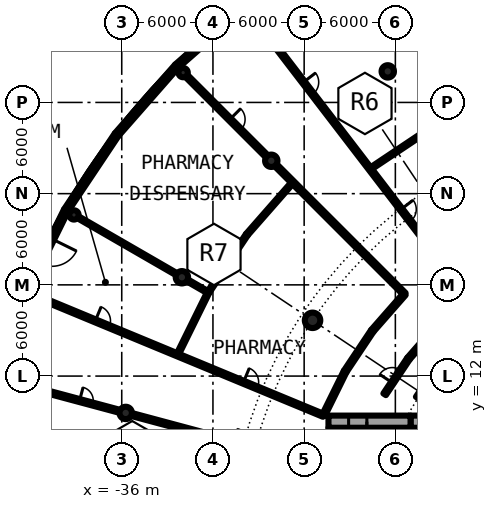
"""IFC4 building model, lengths in metres.
Left out: names, types, materials, properties, quantities, classifications, styles, units other than length and angle.
Written with IfcOpenShell. Run it as: python <this file> out.ifc"""

import sys

from ifc_helpers import new_model, si_unit, direction, frame, frame_2d, origin, origin_2d, place, context, subcontext, project, spatial, rectangle, hollow_circle, i_section, extrude, element, fill, save


model = new_model("IFC4")
c1 = context("Model", 3, precision=1e-05, world=origin(), true_north=direction((0.0, 1.0)))
c2 = subcontext(c1, "Body", "Model", "MODEL_VIEW")
j1 = project(units=[si_unit("LENGTHUNIT", "METRE"), si_unit("PLANEANGLEUNIT", "RADIAN")], contexts=[c1])
p1 = place(None, origin())
s1 = spatial("IfcSite", under=j1, at=p1, CompositionType="ELEMENT")
p2 = place(p1, origin())
s2 = spatial("IfcBuilding", under=s1, at=p2, CompositionType="ELEMENT")
p3 = place(p2, origin())
s3 = spatial("IfcBuildingStorey", under=s2, at=p3, CompositionType="ELEMENT", Elevation=0.0)
p4 = place(p3, frame((-23.448, 15.667, -0.5), z_axis=(0.0, 0.0, 1.0), x_axis=(1.0, 0.0, 0.0)))
e1 = element("IfcColumn", 1, at=p4, inside=s3, PredefinedType="COLUMN", context=c2, shape_type="SweptSolid", body=[
    extrude(hollow_circle(Radius=0.508, WallThickness=0.05, at=origin_2d()), origin(), (0.0, 0.0, 1.0), 5.9),
])
p5 = place(p3, frame((-16.297, 10.889, -0.5), z_axis=(0.0, 0.0, 1.0), x_axis=(-0.831469612303, 0.55557023302, 0.0)))
e2 = element("IfcColumn", 2, at=p5, inside=s3, PredefinedType="COLUMN", context=c2, shape_type="SweptSolid", body=[
    extrude(i_section(OverallWidth=0.303, OverallDepth=0.814, WebThickness=0.021, FlangeThickness=0.04, FilletRadius=0.03, at=origin_2d()), origin(), (0.0, 0.0, 1.0), 5.9),
])
for number, where, z_axis, x_axis in (
    (3, (-18.5, 32.043, -0.5), (0.0, 0.0, 1.0), (1.0, 0.0, 0.0)),
    (4, (-26.163, 26.163, -0.5), (0.0, 0.0, 1.0), (1.0, 0.0, 0.0)),
    (5, (-32.043, 18.5, -0.5), (0.0, 0.0, 1.0), (1.0, 0.0, 0.0)),
    (6, (-35.739, 9.576, -0.5), (0.0, 0.0, 1.0), (1.0, 0.0, 0.0)),
):
    element("IfcColumn", number, at=place(p3, frame(where, z_axis=z_axis, x_axis=x_axis)), inside=s3, PredefinedType="COLUMN", context=c2, shape_type="SweptSolid", body=[
        extrude(hollow_circle(Radius=0.406, WallThickness=0.03, at=origin_2d()), origin(), (0.0, 0.0, 1.0), 5.9),
    ])
for number, where, z_axis, x_axis in (
    (7, (-31.961, 31.961, -0.5), (0.0, 0.0, 1.0), (1.0, 0.0, 0.0)),
    (8, (-39.144, 22.6, -0.5), (0.0, 0.0, 1.0), (1.0, 0.0, 0.0)),
):
    element("IfcColumn", number, at=place(p3, frame(where, z_axis=z_axis, x_axis=x_axis)), inside=s3, PredefinedType="COLUMN", context=c2, shape_type="SweptSolid", body=[
        extrude(hollow_circle(Radius=0.305, WallThickness=0.025, at=origin_2d()), origin(), (0.0, 0.0, 1.0), 5.9),
    ])
p6 = place(p3, frame((-27.881, 36.336, 0.0), z_axis=(0.0, 0.0, 1.0), x_axis=(-0.751748126189, -0.659450342916, 0.0)))
e9 = element("IfcWall", 9, at=p6, inside=s3, PredefinedType="SOLIDWALL", context=c2, shape_type="SweptSolid", body=[
    extrude(rectangle(XDim=5.991, YDim=0.3, at=frame_2d((2.996, 0.0))), origin(), (0.0, 0.0, 1.0), 4.95),
])
p7 = place(p6, frame((1.396, 0.0, 0.3)))
e10 = element("IfcOpeningElement", 10, at=p7, cuts=e9, PredefinedType="OPENING", context=c2, shape_type="SweptSolid", body=[
    extrude(rectangle(XDim=3.2, YDim=3.6, at=frame_2d((1.6, 1.8))), frame((0.0, 0.16, 0.0), z_axis=(0.0, -1.0, 0.0), x_axis=(1.0, 0.0, 0.0)), (0.0, 0.0, 1.0), 0.32),
])
p8 = place(p3, frame((-32.385, 32.385, 0.0), z_axis=(0.0, 0.0, 1.0), x_axis=(-0.659450342916, -0.751748126189, 0.0)))
e11 = element("IfcWall", 11, at=p8, inside=s3, PredefinedType="SOLIDWALL", context=c2, shape_type="SweptSolid", body=[
    extrude(rectangle(XDim=5.991, YDim=0.3, at=frame_2d((2.996, 0.0))), origin(), (0.0, 0.0, 1.0), 4.95),
])
p9 = place(p8, frame((1.396, 0.0, 0.3)))
e12 = element("IfcOpeningElement", 12, at=p9, cuts=e11, PredefinedType="OPENING", context=c2, shape_type="SweptSolid", body=[
    extrude(rectangle(XDim=3.2, YDim=3.6, at=frame_2d((1.6, 1.8))), frame((0.0, 0.16, 0.0), z_axis=(0.0, -1.0, 0.0), x_axis=(1.0, 0.0, 0.0)), (0.0, 0.0, 1.0), 0.32),
])
p10 = place(p3, frame((-36.336, 27.881, 0.0), z_axis=(0.0, 0.0, 1.0), x_axis=(-0.55554631985, -0.831485590074, 0.0)))
e13 = element("IfcWall", 13, at=p10, inside=s3, PredefinedType="SOLIDWALL", context=c2, shape_type="SweptSolid", body=[
    extrude(rectangle(XDim=5.991, YDim=0.3, at=frame_2d((2.995, 0.0))), origin(), (0.0, 0.0, 1.0), 4.95),
])
p11 = place(p10, frame((1.396, 0.0, 0.3)))
e14 = element("IfcOpeningElement", 14, at=p11, cuts=e13, PredefinedType="OPENING", context=c2, shape_type="SweptSolid", body=[
    extrude(rectangle(XDim=3.2, YDim=3.6, at=frame_2d((1.6, 1.8))), frame((0.0, 0.16, 0.0), z_axis=(0.0, -1.0, 0.0), x_axis=(1.0, 0.0, 0.0)), (0.0, 0.0, 1.0), 0.32),
])
p12 = place(p3, frame((-39.664, 22.9, 0.0), z_axis=(0.0, 0.0, 1.0), x_axis=(-0.44233289833, -0.896850939151, 0.0)))
e15 = element("IfcWall", 15, at=p12, inside=s3, PredefinedType="SOLIDWALL", context=c2, shape_type="SweptSolid", body=[
    extrude(rectangle(XDim=5.991, YDim=0.3, at=frame_2d((2.995, 0.0))), origin(), (0.0, 0.0, 1.0), 4.95),
])
p13 = place(p12, frame((2.095, 0.0, 0.0)))
e16 = element("IfcOpeningElement", 16, at=p13, cuts=e15, PredefinedType="OPENING", context=c2, shape_type="SweptSolid", body=[
    extrude(rectangle(XDim=1.8, YDim=2.2, at=frame_2d((0.9, 1.1))), frame((0.0, 0.16, 0.0), z_axis=(0.0, -1.0, 0.0), x_axis=(1.0, 0.0, 0.0)), (0.0, 0.0, 1.0), 0.32),
])
p14 = place(p3, frame((-22.0, -8.6, 0.0), z_axis=(0.0, 0.0, 1.0), x_axis=(0.0, 1.0, 0.0)))
e17 = element("IfcWall", 17, at=p14, inside=s3, PredefinedType="SHEAR", context=c2, shape_type="SweptSolid", body=[
    extrude(rectangle(XDim=17.2, YDim=0.8, at=frame_2d((8.6, 0.0))), origin(), (0.0, 0.0, 1.0), 5.4),
])
p15 = place(p14, frame((7.7, 0.0, 0.0)))
e18 = element("IfcOpeningElement", 18, at=p15, cuts=e17, PredefinedType="OPENING", context=c2, shape_type="SweptSolid", body=[
    extrude(rectangle(XDim=1.8, YDim=2.3, at=frame_2d((0.9, 1.15))), frame((0.0, 0.41, 0.0), z_axis=(0.0, -1.0, 0.0), x_axis=(1.0, 0.0, 0.0)), (0.0, 0.0, 1.0), 0.82),
])
p16 = place(p3, frame((-19.25, 8.6, 0.0), z_axis=(0.0, 0.0, 1.0), x_axis=(0.0, -1.0, 0.0)))
e19 = element("IfcWall", 19, at=p16, inside=s3, PredefinedType="SOLIDWALL", context=c2, shape_type="SweptSolid", body=[
    extrude(rectangle(XDim=7.025, YDim=0.2, at=frame_2d((3.513, 0.0))), origin(), (0.0, 0.0, 1.0), 4.95),
])
p17 = place(p16, frame((2.35, 0.0, 0.0)))
e20 = element("IfcOpeningElement", 20, at=p17, cuts=e19, PredefinedType="OPENING", context=c2, shape_type="SweptSolid", body=[
    extrude(rectangle(XDim=1.1, YDim=2.3, at=frame_2d((0.55, 1.15))), frame((0.0, 0.11, 0.0), z_axis=(0.0, -1.0, 0.0), x_axis=(1.0, 0.0, 0.0)), (0.0, 0.0, 1.0), 0.22),
])
p18 = place(p3, frame((-17.0, 9.0, 0.0), z_axis=(0.0, 0.0, 1.0), x_axis=(1.0, 0.0, 0.0)))
e21 = element("IfcWall", 21, at=p18, inside=s3, PredefinedType="SHEAR", context=c2, shape_type="SweptSolid", body=[
    extrude(rectangle(XDim=8.8, YDim=0.8, at=frame_2d((4.4, 0.0))), origin(), (0.0, 0.0, 1.0), 5.4),
])
p19 = place(p18, frame((2.0, 0.0, 0.0)))
e22 = element("IfcOpeningElement", 22, at=p19, cuts=e21, PredefinedType="OPENING", context=c2, shape_type="SweptSolid", body=[
    extrude(rectangle(XDim=1.2, YDim=2.3, at=frame_2d((0.6, 1.15))), frame((0.0, 0.41, 0.0), z_axis=(0.0, -1.0, 0.0), x_axis=(1.0, 0.0, 0.0)), (0.0, 0.0, 1.0), 0.82),
])
p20 = place(p3, frame((-17.0, 9.0, 0.0), z_axis=(0.0, 0.0, 1.0), x_axis=(-1.0, 0.0, 0.0)))
e23 = element("IfcWall", 23, at=p20, inside=s3, PredefinedType="SHEAR", context=c2, shape_type="SweptSolid", body=[
    extrude(rectangle(XDim=5.4, YDim=0.8, at=frame_2d((2.7, 0.0))), origin(), (0.0, 0.0, 1.0), 5.4),
])
p21 = place(p20, frame((2.875, 0.0, 0.0)))
e24 = element("IfcOpeningElement", 24, at=p21, cuts=e23, PredefinedType="OPENING", context=c2, shape_type="SweptSolid", body=[
    extrude(rectangle(XDim=1.2, YDim=2.3, at=frame_2d((0.6, 1.15))), frame((0.0, 0.41, 0.0), z_axis=(0.0, -1.0, 0.0), x_axis=(1.0, 0.0, 0.0)), (0.0, 0.0, 1.0), 0.82),
])
p22 = place(p3, frame((-43.37, 11.62, 0.0), z_axis=(0.0, 0.0, 1.0), x_axis=(0.965931198614, -0.25879899448, 0.0)))
e25 = element("IfcWall", 25, at=p22, inside=s3, PredefinedType="PARTITIONING", context=c2, shape_type="SweptSolid", body=[
    extrude(rectangle(XDim=7.501, YDim=0.2, at=frame_2d((3.75, 0.0))), origin(), (0.0, 0.0, 1.0), 4.95),
])
p23 = place(p22, frame((4.756, 0.0, 0.0)))
e26 = element("IfcOpeningElement", 26, at=p23, cuts=e25, PredefinedType="OPENING", context=c2, shape_type="SweptSolid", body=[
    extrude(rectangle(XDim=0.9, YDim=2.3, at=frame_2d((0.45, 1.15))), frame((0.0, 0.11, 0.0), z_axis=(0.0, -1.0, 0.0), x_axis=(1.0, 0.0, 0.0)), (0.0, 0.0, 1.0), 0.22),
])
p24 = place(p3, frame((-42.221, 17.489, 0.0), z_axis=(0.0, 0.0, 1.0), x_axis=(0.923857892323, -0.382735672225, 0.0)))
e27 = element("IfcWall", 27, at=p24, inside=s3, PredefinedType="PARTITIONING", context=c2, shape_type="SweptSolid", body=[
    extrude(rectangle(XDim=21.101, YDim=0.2, at=frame_2d((10.55, 0.0))), origin(), (0.0, 0.0, 1.0), 4.95),
])
p25 = place(p24, frame((15.4, 0.0, 0.0)))
e28 = element("IfcOpeningElement", 28, at=p25, cuts=e27, PredefinedType="OPENING", context=c2, shape_type="SweptSolid", body=[
    extrude(rectangle(XDim=1.0, YDim=2.3, at=frame_2d((0.5, 1.15))), frame((0.0, 0.11, 0.0), z_axis=(0.0, -1.0, 0.0), x_axis=(1.0, 0.0, 0.0)), (0.0, 0.0, 1.0), 0.22),
])
p26 = place(p24, frame((4.85, 0.0, 0.0)))
e29 = element("IfcOpeningElement", 29, at=p26, cuts=e27, PredefinedType="OPENING", context=c2, shape_type="SweptSolid", body=[
    extrude(rectangle(XDim=1.0, YDim=2.3, at=frame_2d((0.5, 1.15))), frame((0.0, 0.11, 0.0), z_axis=(0.0, -1.0, 0.0), x_axis=(1.0, 0.0, 0.0)), (0.0, 0.0, 1.0), 0.22),
])
p27 = place(p3, frame((-38.885, 22.45, 0.0), z_axis=(0.0, 0.0, 1.0), x_axis=(0.866055506462, -0.499947857008, 0.0)))
e30 = element("IfcWall", 30, at=p27, inside=s3, PredefinedType="PARTITIONING", context=c2, shape_type="SweptSolid", body=[
    extrude(rectangle(XDim=7.501, YDim=0.15, at=frame_2d((3.75, 0.0))), origin(), (0.0, 0.0, 1.0), 4.95),
])
p28 = place(p3, frame((-35.354, 9.472, 0.0), z_axis=(0.0, 0.0, 1.0), x_axis=(0.965928346829, -0.258809638136, 0.0)))
e31 = element("IfcWall", 31, at=p28, inside=s3, PredefinedType="PARTITIONING", context=c2, shape_type="SweptSolid", body=[
    extrude(rectangle(XDim=12.001, YDim=0.2, at=frame_2d((6.0, 0.0))), origin(), (0.0, 0.0, 1.0), 4.95),
])
p29 = place(p28, frame((7.001, 0.0, 0.0)))
e32 = element("IfcOpeningElement", 32, at=p29, cuts=e31, PredefinedType="OPENING", context=c2, shape_type="SweptSolid", body=[
    extrude(rectangle(XDim=0.9, YDim=2.3, at=frame_2d((0.45, 1.15))), frame((0.0, 0.11, 0.0), z_axis=(0.0, -1.0, 0.0), x_axis=(1.0, 0.0, 0.0)), (0.0, 0.0, 1.0), 0.22),
])
p30 = place(p3, frame((-31.746, 31.746, 0.0), z_axis=(0.0, 0.0, 1.0), x_axis=(0.707106781187, -0.707106781187, 0.0)))
e33 = element("IfcWall", 33, at=p30, inside=s3, PredefinedType="PARTITIONING", context=c2, shape_type="SweptSolid", body=[
    extrude(rectangle(XDim=7.49, YDim=0.2, at=frame_2d((3.745, 0.0))), origin(), (0.0, 0.0, 1.0), 4.95),
])
p31 = place(p30, frame((4.045, 0.0, 0.0)))
e34 = element("IfcOpeningElement", 34, at=p31, cuts=e33, PredefinedType="OPENING", context=c2, shape_type="SweptSolid", body=[
    extrude(rectangle(XDim=1.0, YDim=2.3, at=frame_2d((0.5, 1.15))), frame((0.0, 0.11, 0.0), z_axis=(0.0, -1.0, 0.0), x_axis=(1.0, 0.0, 0.0)), (0.0, 0.0, 1.0), 0.22),
])
p32 = place(p3, frame((-31.697, 18.3, 0.0), z_axis=(0.0, 0.0, 1.0), x_axis=(0.866066190972, -0.499929347863, 0.0)))
e35 = element("IfcWall", 35, at=p32, inside=s3, PredefinedType="PARTITIONING", context=c2, shape_type="SweptSolid", body=[
    extrude(rectangle(XDim=1.6, YDim=0.15, at=frame_2d((0.8, 0.0))), origin(), (0.0, 0.0, 1.0), 4.95),
])
p33 = place(p3, frame((-27.813, 36.247, 0.0), z_axis=(0.0, 0.0, 1.0), x_axis=(0.608725588574, -0.793380840338, 0.0)))
e36 = element("IfcWall", 36, at=p33, inside=s3, PredefinedType="PARTITIONING", context=c2, shape_type="SweptSolid", body=[
    extrude(rectangle(XDim=21.088, YDim=0.2, at=frame_2d((10.544, 0.0))), origin(), (0.0, 0.0, 1.0), 4.95),
])
p34 = place(p33, frame((16.738, 0.0, 0.0)))
e37 = element("IfcOpeningElement", 37, at=p34, cuts=e36, PredefinedType="OPENING", context=c2, shape_type="SweptSolid", body=[
    extrude(rectangle(XDim=1.0, YDim=2.3, at=frame_2d((0.5, 1.15))), frame((0.0, 0.11, 0.0), z_axis=(0.0, -1.0, 0.0), x_axis=(1.0, 0.0, 0.0)), (0.0, 0.0, 1.0), 0.22),
])
p35 = place(p33, frame((6.194, 0.0, 0.0)))
e38 = element("IfcOpeningElement", 38, at=p35, cuts=e36, PredefinedType="OPENING", context=c2, shape_type="SweptSolid", body=[
    extrude(rectangle(XDim=1.0, YDim=2.3, at=frame_2d((0.5, 1.15))), frame((0.0, 0.11, 0.0), z_axis=(0.0, -1.0, 0.0), x_axis=(1.0, 0.0, 0.0)), (0.0, 0.0, 1.0), 0.22),
])
p36 = place(p3, frame((-25.876, 25.876, 0.0), z_axis=(0.0, 0.0, 1.0), x_axis=(0.707106781187, -0.707106781187, 0.0)))
e39 = element("IfcWall", 39, at=p36, inside=s3, PredefinedType="PARTITIONING", context=c2, shape_type="SweptSolid", body=[
    extrude(rectangle(XDim=11.994, YDim=0.2, at=frame_2d((5.997, 0.0))), origin(), (0.0, 0.0, 1.0), 4.95),
])
p37 = place(p3, frame((-18.706, 10.8, 0.0), z_axis=(0.0, 0.0, 1.0), x_axis=(0.55571678686, 0.831371669473, 0.0)))
e40 = element("IfcWall", 40, at=p37, inside=s3, PredefinedType="PARTITIONING", context=c2, shape_type="SweptSolid", body=[
    extrude(rectangle(XDim=2.825, YDim=0.2, at=frame_2d((1.413, 0.0))), origin(), (0.0, 0.0, 1.0), 4.95),
])
p38 = place(p37, frame((0.913, 0.0, 0.0)))
e41 = element("IfcOpeningElement", 41, at=p38, cuts=e40, PredefinedType="OPENING", context=c2, shape_type="SweptSolid", body=[
    extrude(rectangle(XDim=1.0, YDim=2.3, at=frame_2d((0.5, 1.15))), frame((0.0, 0.11, 0.0), z_axis=(0.0, -1.0, 0.0), x_axis=(1.0, 0.0, 0.0)), (0.0, 0.0, 1.0), 0.22),
])
p39 = place(p3, frame((-17.136, 13.149, 0.0), z_axis=(0.0, 0.0, 1.0), x_axis=(0.659042776199, 0.752105457459, 0.0)))
e42 = element("IfcWall", 42, at=p39, inside=s3, PredefinedType="PARTITIONING", context=c2, shape_type="SweptSolid", body=[
    extrude(rectangle(XDim=2.825, YDim=0.2, at=frame_2d((1.413, 0.0))), origin(), (0.0, 0.0, 1.0), 4.95),
])
p40 = place(p3, frame((-22.727, 9.414, 0.0), z_axis=(0.0, 0.0, 1.0), x_axis=(0.442259878763, 0.896886949195, 0.0)))
e43 = element("IfcWall", 43, at=p40, inside=s3, PredefinedType="PARTITIONING", context=c2, shape_type="SweptSolid", body=[
    extrude(rectangle(XDim=3.218, YDim=0.2, at=frame_2d((1.609, 0.0))), origin(), (0.0, 0.0, 1.0), 4.95),
])
p41 = place(p3, frame((-21.304, 12.3, 0.0), z_axis=(0.0, 0.0, 1.0), x_axis=(0.555522714148, 0.831501361433, 0.0)))
e44 = element("IfcWall", 44, at=p41, inside=s3, PredefinedType="PARTITIONING", context=c2, shape_type="SweptSolid", body=[
    extrude(rectangle(XDim=3.218, YDim=0.2, at=frame_2d((1.609, 0.0))), origin(), (0.0, 0.0, 1.0), 4.95),
])
p42 = place(p3, frame((-19.516, 14.976, 0.0), z_axis=(0.0, 0.0, 1.0), x_axis=(0.659299366608, 0.751880539175, 0.0)))
e45 = element("IfcWall", 45, at=p42, inside=s3, PredefinedType="PARTITIONING", context=c2, shape_type="SweptSolid", body=[
    extrude(rectangle(XDim=3.217, YDim=0.2, at=frame_2d((1.609, 0.0))), origin(), (0.0, 0.0, 1.0), 4.95),
])
p43 = place(p3, frame((-19.663, 25.625, 0.0), z_axis=(0.0, 0.0, 1.0), x_axis=(0.831418647409, 0.555646499801, 0.0)))
e46 = element("IfcWall", 46, at=p43, inside=s3, PredefinedType="PARTITIONING", context=c2, shape_type="SweptSolid", body=[
    extrude(rectangle(XDim=4.226, YDim=0.15, at=frame_2d((2.113, 0.0))), origin(), (0.0, 0.0, 1.0), 4.95),
])
p44 = place(p3, frame((-33.412, 4.399, 0.0), z_axis=(0.0, 0.0, 1.0), x_axis=(0.19513607482, 0.980776178495, 0.0)))
e47 = element("IfcWall", 47, at=p44, inside=s3, PredefinedType="PARTITIONING", context=c2, shape_type="SweptSolid", body=[
    extrude(rectangle(XDim=4.408, YDim=0.15, at=frame_2d((2.204, 0.0))), origin(), (0.0, 0.0, 1.0), 4.95),
])
p45 = place(p3, frame((-32.336, 13.394, 0.0), z_axis=(0.0, 0.0, 1.0), x_axis=(0.442300710668, 0.896866813603, 0.0)))
e48 = element("IfcWall", 48, at=p45, inside=s3, PredefinedType="PARTITIONING", context=c2, shape_type="SweptSolid", body=[
    extrude(rectangle(XDim=4.578, YDim=0.15, at=frame_2d((2.289, 0.0))), origin(), (0.0, 0.0, 1.0), 4.95),
])
p46 = place(p3, frame((-30.311, 17.5, 0.0), z_axis=(0.0, 0.0, 1.0), x_axis=(0.555610431873, 0.831442750882, 0.0)))
e49 = element("IfcWall", 49, at=p46, inside=s3, PredefinedType="PARTITIONING", context=c2, shape_type="SweptSolid", body=[
    extrude(rectangle(XDim=4.579, YDim=0.15, at=frame_2d((2.289, 0.0))), origin(), (0.0, 0.0, 1.0), 4.95),
])
p47 = place(p3, frame((-27.767, 21.307, 0.0), z_axis=(0.0, 0.0, 1.0), x_axis=(0.659270714245, 0.751905662526, 0.0)))
e50 = element("IfcWall", 50, at=p47, inside=s3, PredefinedType="PARTITIONING", context=c2, shape_type="SweptSolid", body=[
    extrude(rectangle(XDim=4.578, YDim=0.15, at=frame_2d((2.289, 0.0))), origin(), (0.0, 0.0, 1.0), 4.95),
])
p48 = place(p7, origin())
e51 = element("IfcWindow", 51, at=p48, inside=s3, PartitioningType="SINGLE_PANEL", PredefinedType="WINDOW", context=c2, shape_type="SweptSolid", body=[
    extrude(rectangle(XDim=3.2, YDim=3.6, at=frame_2d((1.6, 1.8))), frame((0.0, 0.03, 0.0), z_axis=(0.0, -1.0, 0.0), x_axis=(1.0, 0.0, 0.0)), (0.0, 0.0, 1.0), 0.06),
])
fill(e10, e51)
p49 = place(p9, origin())
e52 = element("IfcWindow", 52, at=p49, inside=s3, PartitioningType="SINGLE_PANEL", PredefinedType="WINDOW", context=c2, shape_type="SweptSolid", body=[
    extrude(rectangle(XDim=3.2, YDim=3.6, at=frame_2d((1.6, 1.8))), frame((0.0, 0.03, 0.0), z_axis=(0.0, -1.0, 0.0), x_axis=(1.0, 0.0, 0.0)), (0.0, 0.0, 1.0), 0.06),
])
fill(e12, e52)
p50 = place(p11, origin())
e53 = element("IfcWindow", 53, at=p50, inside=s3, PartitioningType="SINGLE_PANEL", PredefinedType="WINDOW", context=c2, shape_type="SweptSolid", body=[
    extrude(rectangle(XDim=3.2, YDim=3.6, at=frame_2d((1.6, 1.8))), frame((0.0, 0.03, 0.0), z_axis=(0.0, -1.0, 0.0), x_axis=(1.0, 0.0, 0.0)), (0.0, 0.0, 1.0), 0.06),
])
fill(e14, e53)
p51 = place(p21, origin())
e54 = element("IfcDoor", 54, at=p51, inside=s3, OperationType="SINGLE_SWING_LEFT", PredefinedType="DOOR", context=c2, shape_type="SweptSolid", body=[
    extrude(rectangle(XDim=1.2, YDim=2.3, at=frame_2d((0.6, 1.15))), frame((0.0, 0.025, 0.0), z_axis=(0.0, -1.0, 0.0), x_axis=(1.0, 0.0, 0.0)), (0.0, 0.0, 1.0), 0.05),
])
fill(e24, e54)
p52 = place(p38, origin())
e55 = element("IfcDoor", 55, at=p52, inside=s3, OperationType="SINGLE_SWING_RIGHT", PredefinedType="DOOR", context=c2, shape_type="SweptSolid", body=[
    extrude(rectangle(XDim=1.0, YDim=2.3, at=frame_2d((0.5, 1.15))), frame((0.0, 0.025, 0.0), z_axis=(0.0, -1.0, 0.0), x_axis=(1.0, 0.0, 0.0)), (0.0, 0.0, 1.0), 0.05),
])
fill(e41, e55)
p53 = place(p34, origin())
e56 = element("IfcDoor", 56, at=p53, inside=s3, OperationType="SINGLE_SWING_RIGHT", PredefinedType="DOOR", context=c2, shape_type="SweptSolid", body=[
    extrude(rectangle(XDim=1.0, YDim=2.3, at=frame_2d((0.5, 1.15))), frame((0.0, 0.025, 0.0), z_axis=(0.0, -1.0, 0.0), x_axis=(1.0, 0.0, 0.0)), (0.0, 0.0, 1.0), 0.05),
])
fill(e37, e56)
p54 = place(p35, origin())
e57 = element("IfcDoor", 57, at=p54, inside=s3, OperationType="SINGLE_SWING_LEFT", PredefinedType="DOOR", context=c2, shape_type="SweptSolid", body=[
    extrude(rectangle(XDim=1.0, YDim=2.3, at=frame_2d((0.5, 1.15))), frame((0.0, 0.025, 0.0), z_axis=(0.0, -1.0, 0.0), x_axis=(1.0, 0.0, 0.0)), (0.0, 0.0, 1.0), 0.05),
])
fill(e38, e57)
p55 = place(p25, origin())
e58 = element("IfcDoor", 58, at=p55, inside=s3, OperationType="SINGLE_SWING_RIGHT", PredefinedType="DOOR", context=c2, shape_type="SweptSolid", body=[
    extrude(rectangle(XDim=1.0, YDim=2.3, at=frame_2d((0.5, 1.15))), frame((0.0, 0.025, 0.0), z_axis=(0.0, -1.0, 0.0), x_axis=(1.0, 0.0, 0.0)), (0.0, 0.0, 1.0), 0.05),
])
fill(e28, e58)
p56 = place(p31, origin())
e59 = element("IfcDoor", 59, at=p56, inside=s3, OperationType="SINGLE_SWING_RIGHT", PredefinedType="DOOR", context=c2, shape_type="SweptSolid", body=[
    extrude(rectangle(XDim=1.0, YDim=2.3, at=frame_2d((0.5, 1.15))), frame((0.0, 0.025, 0.0), z_axis=(0.0, -1.0, 0.0), x_axis=(1.0, 0.0, 0.0)), (0.0, 0.0, 1.0), 0.05),
])
fill(e34, e59)
p57 = place(p26, origin())
e60 = element("IfcDoor", 60, at=p57, inside=s3, OperationType="SINGLE_SWING_LEFT", PredefinedType="DOOR", context=c2, shape_type="SweptSolid", body=[
    extrude(rectangle(XDim=1.0, YDim=2.3, at=frame_2d((0.5, 1.15))), frame((0.0, 0.025, 0.0), z_axis=(0.0, -1.0, 0.0), x_axis=(1.0, 0.0, 0.0)), (0.0, 0.0, 1.0), 0.05),
])
fill(e29, e60)
p58 = place(p23, origin())
e61 = element("IfcDoor", 61, at=p58, inside=s3, OperationType="SINGLE_SWING_RIGHT", PredefinedType="DOOR", context=c2, shape_type="SweptSolid", body=[
    extrude(rectangle(XDim=0.9, YDim=2.3, at=frame_2d((0.45, 1.15))), frame((0.0, 0.025, 0.0), z_axis=(0.0, -1.0, 0.0), x_axis=(1.0, 0.0, 0.0)), (0.0, 0.0, 1.0), 0.05),
])
fill(e26, e61)
save(model, sys.argv[1])
